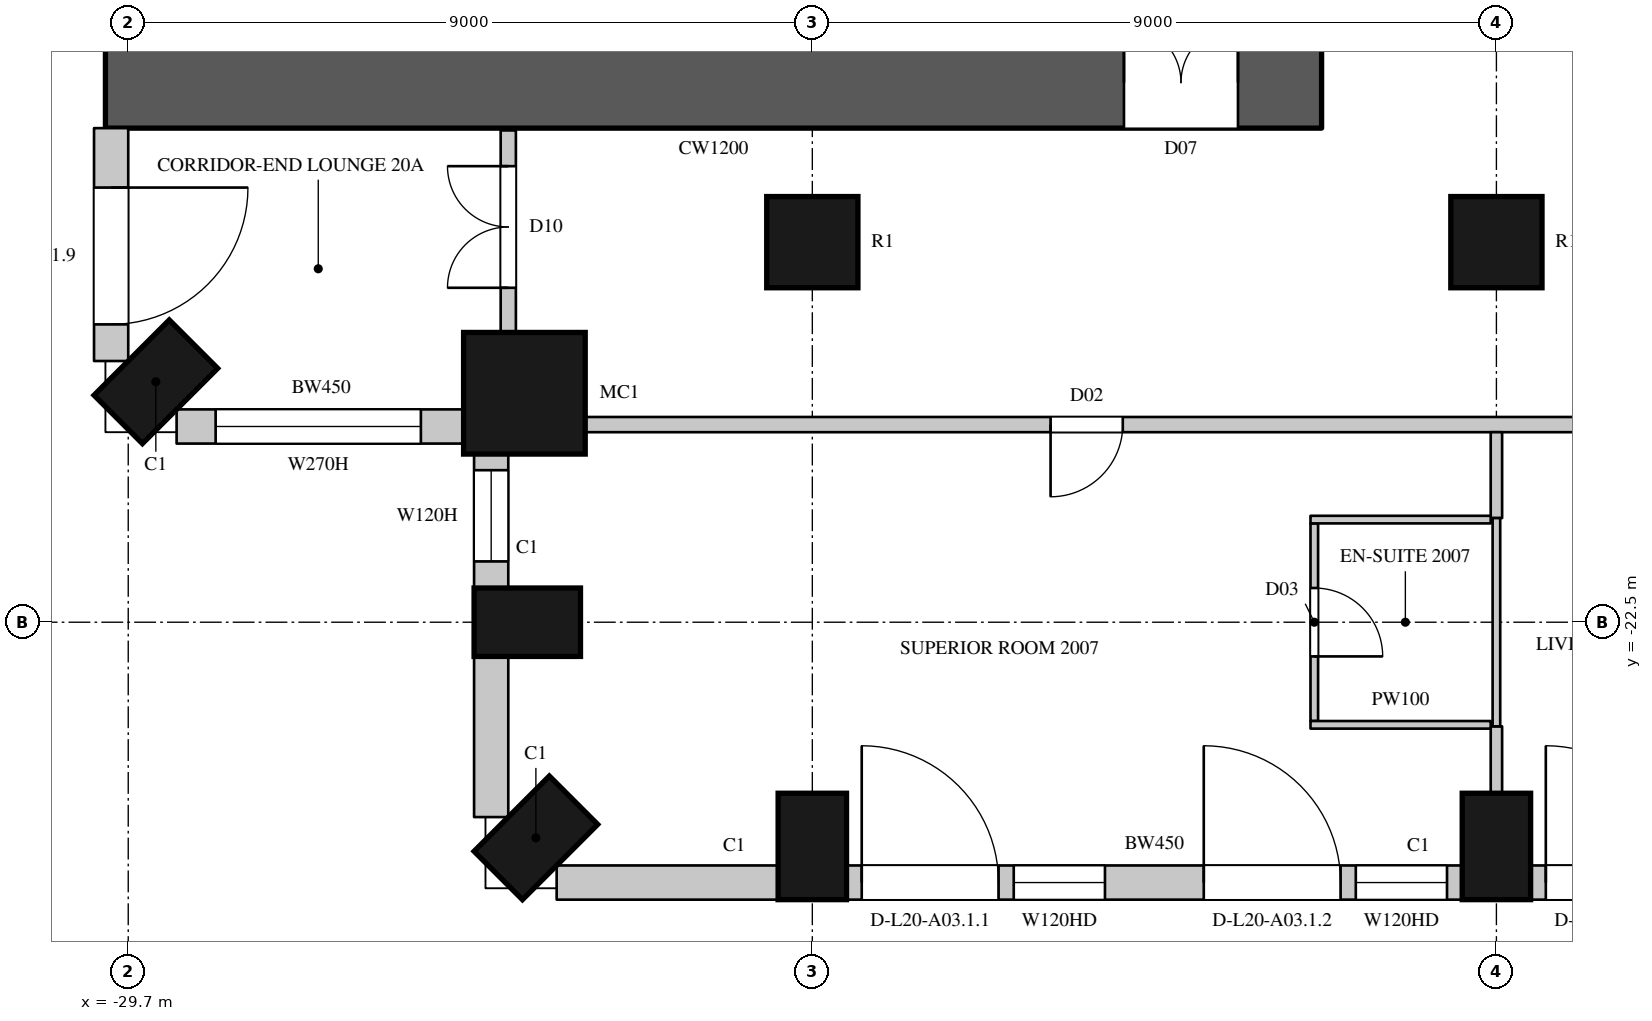
"""IFC4 building model, lengths in metres.
Left out: names, types, materials, properties, quantities, classifications, styles, units other than length and angle.
Written with IfcOpenShell. Run it as: python <this file> out.ifc"""

import sys

from ifc_helpers import new_model, si_unit, direction, frame, frame_2d, origin, origin_2d, place, context, subcontext, project, spatial, rectangle, circle, extrude, element, fill, save


model = new_model("IFC4")
c1 = context("Model", 3, precision=1e-05, world=origin(), true_north=direction((0.0, 1.0)))
c2 = subcontext(c1, "Body", "Model", "MODEL_VIEW")
j1 = project(units=[si_unit("LENGTHUNIT", "METRE"), si_unit("PLANEANGLEUNIT", "RADIAN")], contexts=[c1])
p1 = place(None, origin())
s1 = spatial("IfcSite", under=j1, at=p1, CompositionType="ELEMENT")
p2 = place(p1, origin())
s2 = spatial("IfcBuilding", under=s1, at=p2, CompositionType="ELEMENT")
p3 = place(p2, frame((0.0, 0.0, 102.3)))
s3 = spatial("IfcBuildingStorey", under=s2, at=p3, CompositionType="ELEMENT", Elevation=102.3)
p4 = place(p3, frame((-29.337, -19.337, 0.0), z_axis=(0.0, 0.0, 1.0), x_axis=(0.707106781187, -0.707106781187, 0.0)))
e1 = element("IfcColumn", 1, at=p4, inside=s3, PredefinedType="COLUMN", context=c2, shape_type="SweptSolid", body=[
    extrude(rectangle(XDim=0.9, YDim=1.4, at=origin_2d()), origin(), (0.0, 0.0, 1.0), 3.6),
])
p5 = place(p3, frame((-24.488, -19.488, 0.0), z_axis=(0.0, 0.0, 1.0), x_axis=(1.0, 0.0, 0.0)))
e2 = element("IfcColumn", 2, at=p5, inside=s3, PredefinedType="COLUMN", context=c2, shape_type="SweptSolid", body=[
    extrude(circle(Radius=0.8, at=origin_2d()), origin(), (0.0, 0.0, 1.0), 3.6),
])
for number, where, z_axis, x_axis in (
    (3, (-24.45, -22.5, 0.0), (0.0, 0.0, 1.0), (0.0, -1.0, 0.0)),
    (4, (-24.337, -25.337, 0.0), (0.0, 0.0, 1.0), (0.707, -0.707, 0.0)),
    (5, (-20.7, -25.45, 0.0), (0.0, 0.0, 1.0), (1.0, 0.0, 0.0)),
    (6, (-11.7, -25.45, 0.0), (0.0, 0.0, 1.0), (1.0, 0.0, 0.0)),
):
    element("IfcColumn", number, at=place(p3, frame(where, z_axis=z_axis, x_axis=x_axis)), inside=s3, PredefinedType="COLUMN", context=c2, shape_type="SweptSolid", body=[
        extrude(rectangle(XDim=0.9, YDim=1.4, at=origin_2d()), origin(), (0.0, 0.0, 1.0), 3.6),
    ])
for number, where, z_axis, x_axis in (
    (7, (-20.7, -17.5, 0.0), (0.0, 0.0, 1.0), (1.0, 0.0, 0.0)),
    (8, (-11.7, -17.5, 0.0), (0.0, 0.0, 1.0), (1.0, 0.0, 0.0)),
):
    element("IfcColumn", number, at=place(p3, frame(where, z_axis=z_axis, x_axis=x_axis)), inside=s3, PredefinedType="COLUMN", context=c2, shape_type="SweptSolid", body=[
        extrude(circle(Radius=0.6, at=origin_2d()), origin(), (0.0, 0.0, 1.0), 3.6),
    ])
p6 = place(p3, frame((-29.925, -16.0, 0.0), z_axis=(0.0, 0.0, 1.0), x_axis=(0.0, -1.0, 0.0)))
e9 = element("IfcWall", 9, at=p6, inside=s3, PredefinedType="SOLIDWALL", context=c2, shape_type="SweptSolid", body=[
    extrude(rectangle(XDim=3.064, YDim=0.45, at=frame_2d((1.532, 0.0))), origin(), (0.0, 0.0, 1.0), 3.3),
])
p7 = place(p6, frame((0.782, 0.0, 0.0)))
e10 = element("IfcOpeningElement", 10, at=p7, cuts=e9, PredefinedType="OPENING", context=c2, shape_type="SweptSolid", body=[
    extrude(rectangle(XDim=1.8, YDim=2.4, at=frame_2d((0.9, 1.2))), frame((0.0, 0.235, 0.0), z_axis=(0.0, -1.0, 0.0), x_axis=(1.0, 0.0, 0.0)), (0.0, 0.0, 1.0), 0.47),
])
p8 = place(p3, frame((-29.064, -19.925, 0.0), z_axis=(0.0, 0.0, 1.0), x_axis=(1.0, 0.0, 0.0)))
e11 = element("IfcWall", 11, at=p8, inside=s3, PredefinedType="SOLIDWALL", context=c2, shape_type="SweptSolid", body=[
    extrude(rectangle(XDim=3.805, YDim=0.45, at=frame_2d((1.903, 0.0))), origin(), (0.0, 0.0, 1.0), 3.3),
])
p9 = place(p8, frame((0.514, 0.0, 1.05)))
e12 = element("IfcOpeningElement", 12, at=p9, cuts=e11, PredefinedType="OPENING", context=c2, shape_type="SweptSolid", body=[
    extrude(rectangle(XDim=2.7, YDim=2.0, at=frame_2d((1.35, 1.0))), frame((0.0, 0.235, 0.0), z_axis=(0.0, -1.0, 0.0), x_axis=(1.0, 0.0, 0.0)), (0.0, 0.0, 1.0), 0.47),
])
p10 = place(p3, frame((-24.925, -20.259, 0.0), z_axis=(0.0, 0.0, 1.0), x_axis=(0.0, -1.0, 0.0)))
e13 = element("IfcWall", 13, at=p10, inside=s3, PredefinedType="SOLIDWALL", context=c2, shape_type="SweptSolid", body=[
    extrude(rectangle(XDim=1.792, YDim=0.45, at=frame_2d((0.896, 0.0))), origin(), (0.0, 0.0, 1.0), 3.3),
])
p11 = place(p10, frame((0.241, 0.0, 1.05)))
e14 = element("IfcOpeningElement", 14, at=p11, cuts=e13, PredefinedType="OPENING", context=c2, shape_type="SweptSolid", body=[
    extrude(rectangle(XDim=1.2, YDim=2.0, at=frame_2d((0.6, 1.0))), frame((0.0, 0.235, 0.0), z_axis=(0.0, -1.0, 0.0), x_axis=(1.0, 0.0, 0.0)), (0.0, 0.0, 1.0), 0.47),
])
p12 = place(p3, frame((-24.925, -22.95, 0.0), z_axis=(0.0, 0.0, 1.0), x_axis=(0.0, -1.0, 0.0)))
e15 = element("IfcWall", 15, at=p12, inside=s3, PredefinedType="SOLIDWALL", context=c2, shape_type="SweptSolid", body=[
    extrude(rectangle(XDim=2.114, YDim=0.45, at=frame_2d((1.057, 0.0))), origin(), (0.0, 0.0, 1.0), 3.3),
])
p13 = place(p3, frame((-24.064, -25.925, 0.0), z_axis=(0.0, 0.0, 1.0), x_axis=(1.0, 0.0, 0.0)))
e16 = element("IfcWall", 16, at=p13, inside=s3, PredefinedType="SOLIDWALL", context=c2, shape_type="SweptSolid", body=[
    extrude(rectangle(XDim=2.914, YDim=0.45, at=frame_2d((1.457, 0.0))), origin(), (0.0, 0.0, 1.0), 3.3),
])
p14 = place(p3, frame((-20.25, -25.925, 0.0), z_axis=(0.0, 0.0, 1.0), x_axis=(1.0, 0.0, 0.0)))
e17 = element("IfcWall", 17, at=p14, inside=s3, PredefinedType="SOLIDWALL", context=c2, shape_type="SweptSolid", body=[
    extrude(rectangle(XDim=8.1, YDim=0.45, at=frame_2d((4.05, 0.0))), origin(), (0.0, 0.0, 1.0), 3.3),
])
p15 = place(p14, frame((0.2, 0.0, 0.0)))
e18 = element("IfcOpeningElement", 18, at=p15, cuts=e17, PredefinedType="OPENING", context=c2, shape_type="SweptSolid", body=[
    extrude(rectangle(XDim=1.8, YDim=2.4, at=frame_2d((0.9, 1.2))), frame((0.0, 0.235, 0.0), z_axis=(0.0, -1.0, 0.0), x_axis=(1.0, 0.0, 0.0)), (0.0, 0.0, 1.0), 0.47),
])
p16 = place(p14, frame((2.2, 0.0, 1.05)))
e19 = element("IfcOpeningElement", 19, at=p16, cuts=e17, PredefinedType="OPENING", context=c2, shape_type="SweptSolid", body=[
    extrude(rectangle(XDim=1.2, YDim=2.0, at=frame_2d((0.6, 1.0))), frame((0.0, 0.235, 0.0), z_axis=(0.0, -1.0, 0.0), x_axis=(1.0, 0.0, 0.0)), (0.0, 0.0, 1.0), 0.47),
])
p17 = place(p14, frame((4.7, 0.0, 0.0)))
e20 = element("IfcOpeningElement", 20, at=p17, cuts=e17, PredefinedType="OPENING", context=c2, shape_type="SweptSolid", body=[
    extrude(rectangle(XDim=1.8, YDim=2.4, at=frame_2d((0.9, 1.2))), frame((0.0, 0.235, 0.0), z_axis=(0.0, -1.0, 0.0), x_axis=(1.0, 0.0, 0.0)), (0.0, 0.0, 1.0), 0.47),
])
p18 = place(p14, frame((6.7, 0.0, 1.05)))
e21 = element("IfcOpeningElement", 21, at=p18, cuts=e17, PredefinedType="OPENING", context=c2, shape_type="SweptSolid", body=[
    extrude(rectangle(XDim=1.2, YDim=2.0, at=frame_2d((0.6, 1.0))), frame((0.0, 0.235, 0.0), z_axis=(0.0, -1.0, 0.0), x_axis=(1.0, 0.0, 0.0)), (0.0, 0.0, 1.0), 0.47),
])
p19 = place(p3, frame((-11.25, -25.925, 0.0), z_axis=(0.0, 0.0, 1.0), x_axis=(1.0, 0.0, 0.0)))
e22 = element("IfcWall", 22, at=p19, inside=s3, PredefinedType="SOLIDWALL", context=c2, shape_type="SweptSolid", body=[
    extrude(rectangle(XDim=8.1, YDim=0.45, at=frame_2d((4.05, 0.0))), origin(), (0.0, 0.0, 1.0), 3.3),
])
p20 = place(p19, frame((0.2, 0.0, 0.0)))
e23 = element("IfcOpeningElement", 23, at=p20, cuts=e22, PredefinedType="OPENING", context=c2, shape_type="SweptSolid", body=[
    extrude(rectangle(XDim=1.8, YDim=2.4, at=frame_2d((0.9, 1.2))), frame((0.0, 0.235, 0.0), z_axis=(0.0, -1.0, 0.0), x_axis=(1.0, 0.0, 0.0)), (0.0, 0.0, 1.0), 0.47),
])
p21 = place(p19, frame((2.2, 0.0, 1.05)))
e24 = element("IfcOpeningElement", 24, at=p21, cuts=e22, PredefinedType="OPENING", context=c2, shape_type="SweptSolid", body=[
    extrude(rectangle(XDim=1.2, YDim=2.0, at=frame_2d((0.6, 1.0))), frame((0.0, 0.235, 0.0), z_axis=(0.0, -1.0, 0.0), x_axis=(1.0, 0.0, 0.0)), (0.0, 0.0, 1.0), 0.47),
])
p22 = place(p19, frame((4.7, 0.0, 0.0)))
e25 = element("IfcOpeningElement", 25, at=p22, cuts=e22, PredefinedType="OPENING", context=c2, shape_type="SweptSolid", body=[
    extrude(rectangle(XDim=1.8, YDim=2.4, at=frame_2d((0.9, 1.2))), frame((0.0, 0.235, 0.0), z_axis=(0.0, -1.0, 0.0), x_axis=(1.0, 0.0, 0.0)), (0.0, 0.0, 1.0), 0.47),
])
p23 = place(p19, frame((6.7, 0.0, 1.05)))
e26 = element("IfcOpeningElement", 26, at=p23, cuts=e22, PredefinedType="OPENING", context=c2, shape_type="SweptSolid", body=[
    extrude(rectangle(XDim=1.2, YDim=2.0, at=frame_2d((0.6, 1.0))), frame((0.0, 0.235, 0.0), z_axis=(0.0, -1.0, 0.0), x_axis=(1.0, 0.0, 0.0)), (0.0, 0.0, 1.0), 0.47),
])
p24 = place(p3, frame((-30.0, -15.4, 0.0), z_axis=(0.0, 0.0, 1.0), x_axis=(1.0, 0.0, 0.0)))
e27 = element("IfcWall", 27, at=p24, inside=s3, PredefinedType="SHEAR", context=c2, shape_type="SweptSolid", body=[
    extrude(rectangle(XDim=16.0, YDim=1.2, at=frame_2d((8.0, 0.0))), origin(), (0.0, 0.0, 1.0), 3.6),
])
p25 = place(p24, frame((13.4, 0.0, 0.0)))
e28 = element("IfcOpeningElement", 28, at=p25, cuts=e27, PredefinedType="OPENING", context=c2, shape_type="SweptSolid", body=[
    extrude(rectangle(XDim=1.5, YDim=2.4, at=frame_2d((0.75, 1.2))), frame((0.0, 0.61, 0.0), z_axis=(0.0, -1.0, 0.0), x_axis=(1.0, 0.0, 0.0)), (0.0, 0.0, 1.0), 1.22),
])
p26 = place(p3, frame((-24.7, -18.7, 0.0), z_axis=(0.0, 0.0, 1.0), x_axis=(0.0, 1.0, 0.0)))
e29 = element("IfcWall", 29, at=p26, inside=s3, PredefinedType="PARTITIONING", context=c2, shape_type="SweptSolid", body=[
    extrude(rectangle(XDim=2.67, YDim=0.2, at=frame_2d((1.335, 0.0))), origin(), (0.0, 0.0, 1.0), 3.3),
])
p27 = place(p26, frame((0.6, 0.0, 0.0)))
e30 = element("IfcOpeningElement", 30, at=p27, cuts=e29, PredefinedType="OPENING", context=c2, shape_type="SweptSolid", body=[
    extrude(rectangle(XDim=1.6, YDim=2.4, at=frame_2d((0.8, 1.2))), frame((0.0, 0.11, 0.0), z_axis=(0.0, -1.0, 0.0), x_axis=(1.0, 0.0, 0.0)), (0.0, 0.0, 1.0), 0.22),
])
p28 = place(p3, frame((-23.765, -19.9, 0.0), z_axis=(0.0, 0.0, 1.0), x_axis=(1.0, 0.0, 0.0)))
e31 = element("IfcWall", 31, at=p28, inside=s3, PredefinedType="PARTITIONING", context=c2, shape_type="SweptSolid", body=[
    extrude(rectangle(XDim=42.125, YDim=0.2, at=frame_2d((21.063, 0.0))), origin(), (0.0, 0.0, 1.0), 3.3),
])
p29 = place(p28, frame((6.2, 0.0, 0.0)))
e32 = element("IfcOpeningElement", 32, at=p29, cuts=e31, PredefinedType="OPENING", context=c2, shape_type="SweptSolid", body=[
    extrude(rectangle(XDim=0.95, YDim=2.2, at=frame_2d((0.475, 1.1))), frame((0.0, 0.11, 0.0), z_axis=(0.0, -1.0, 0.0), x_axis=(1.0, 0.0, 0.0)), (0.0, 0.0, 1.0), 0.22),
])
p30 = place(p28, frame((14.1, 0.0, 0.0)))
e33 = element("IfcOpeningElement", 33, at=p30, cuts=e31, PredefinedType="OPENING", context=c2, shape_type="SweptSolid", body=[
    extrude(rectangle(XDim=1.1, YDim=2.4, at=frame_2d((0.55, 1.2))), frame((0.0, 0.11, 0.0), z_axis=(0.0, -1.0, 0.0), x_axis=(1.0, 0.0, 0.0)), (0.0, 0.0, 1.0), 0.22),
])
p31 = place(p28, frame((24.2, 0.0, 0.0)))
e34 = element("IfcOpeningElement", 34, at=p31, cuts=e31, PredefinedType="OPENING", context=c2, shape_type="SweptSolid", body=[
    extrude(rectangle(XDim=0.95, YDim=2.2, at=frame_2d((0.475, 1.1))), frame((0.0, 0.11, 0.0), z_axis=(0.0, -1.0, 0.0), x_axis=(1.0, 0.0, 0.0)), (0.0, 0.0, 1.0), 0.22),
])
p32 = place(p28, frame((32.9, 0.0, 0.0)))
e35 = element("IfcOpeningElement", 35, at=p32, cuts=e31, PredefinedType="OPENING", context=c2, shape_type="SweptSolid", body=[
    extrude(rectangle(XDim=1.1, YDim=2.4, at=frame_2d((0.55, 1.2))), frame((0.0, 0.11, 0.0), z_axis=(0.0, -1.0, 0.0), x_axis=(1.0, 0.0, 0.0)), (0.0, 0.0, 1.0), 0.22),
])
p33 = place(p3, frame((-11.7, -24.75, 0.0), z_axis=(0.0, 0.0, 1.0), x_axis=(0.0, 1.0, 0.0)))
e36 = element("IfcWall", 36, at=p33, inside=s3, PredefinedType="PARTITIONING", context=c2, shape_type="SweptSolid", body=[
    extrude(rectangle(XDim=0.88, YDim=0.15, at=frame_2d((0.44, 0.0))), origin(), (0.0, 0.0, 1.0), 2.75),
])
p34 = place(p3, frame((-11.7, -21.13, 0.0), z_axis=(0.0, 0.0, 1.0), x_axis=(0.0, 1.0, 0.0)))
e37 = element("IfcWall", 37, at=p34, inside=s3, PredefinedType="PARTITIONING", context=c2, shape_type="SweptSolid", body=[
    extrude(rectangle(XDim=1.13, YDim=0.15, at=frame_2d((0.565, 0.0))), origin(), (0.0, 0.0, 1.0), 2.75),
])
p35 = place(p3, frame((-14.096, -23.8, 0.0), z_axis=(0.0, 0.0, 1.0), x_axis=(0.0, 1.0, 0.0)))
e38 = element("IfcWall", 38, at=p35, inside=s3, PredefinedType="PARTITIONING", context=c2, shape_type="SweptSolid", body=[
    extrude(rectangle(XDim=2.6, YDim=0.1, at=frame_2d((1.3, 0.0))), origin(), (0.0, 0.0, 1.0), 3.3),
])
p36 = place(p35, frame((0.85, 0.0, 0.0)))
e39 = element("IfcOpeningElement", 39, at=p36, cuts=e38, PredefinedType="OPENING", context=c2, shape_type="SweptSolid", body=[
    extrude(rectangle(XDim=0.9, YDim=2.2, at=frame_2d((0.45, 1.1))), frame((0.0, 0.06, 0.0), z_axis=(0.0, -1.0, 0.0), x_axis=(1.0, 0.0, 0.0)), (0.0, 0.0, 1.0), 0.12),
])
for number, where, z_axis, x_axis in (
    (40, (-14.146, -23.85, 0.0), (0.0, 0.0, 1.0), (1.0, 0.0, 0.0)),
    (41, (-14.146, -21.15, 0.0), (0.0, 0.0, 1.0), (1.0, 0.0, 0.0)),
):
    element("IfcWall", number, at=place(p3, frame(where, z_axis=z_axis, x_axis=x_axis)), inside=s3, PredefinedType="PARTITIONING", context=c2, shape_type="SweptSolid", body=[
        extrude(rectangle(XDim=2.371, YDim=0.1, at=frame_2d((1.186, 0.0))), origin(), (0.0, 0.0, 1.0), 3.3),
    ])
p37 = place(p3, frame((-11.7, -23.87, 0.0), z_axis=(0.0, 0.0, 1.0), x_axis=(0.0, 1.0, 0.0)))
e42 = element("IfcWall", 42, at=p37, inside=s3, PredefinedType="PARTITIONING", context=c2, shape_type="SweptSolid", body=[
    extrude(rectangle(XDim=2.74, YDim=0.1, at=frame_2d((1.37, 0.0))), origin(), (0.0, 0.0, 1.0), 2.75),
])
p38 = place(p7, origin())
e43 = element("IfcDoor", 43, at=p38, inside=s3, OperationType="SLIDING_TO_LEFT", PredefinedType="DOOR", context=c2, shape_type="SweptSolid", body=[
    extrude(rectangle(XDim=1.8, YDim=2.4, at=frame_2d((0.9, 1.2))), frame((0.0, 0.13, 0.0), z_axis=(0.0, -1.0, 0.0), x_axis=(1.0, 0.0, 0.0)), (0.0, 0.0, 1.0), 0.05),
])
fill(e10, e43)
p39 = place(p9, origin())
e44 = element("IfcWindow", 44, at=p39, inside=s3, PartitioningType="SINGLE_PANEL", PredefinedType="WINDOW", context=c2, shape_type="SweptSolid", body=[
    extrude(rectangle(XDim=2.7, YDim=2.0, at=frame_2d((1.35, 1.0))), frame((0.0, 0.135, 0.0), z_axis=(0.0, -1.0, 0.0), x_axis=(1.0, 0.0, 0.0)), (0.0, 0.0, 1.0), 0.06),
])
fill(e12, e44)
p40 = place(p11, origin())
e45 = element("IfcWindow", 45, at=p40, inside=s3, PartitioningType="SINGLE_PANEL", PredefinedType="WINDOW", context=c2, shape_type="SweptSolid", body=[
    extrude(rectangle(XDim=1.2, YDim=2.0, at=frame_2d((0.6, 1.0))), frame((0.0, 0.135, 0.0), z_axis=(0.0, -1.0, 0.0), x_axis=(1.0, 0.0, 0.0)), (0.0, 0.0, 1.0), 0.06),
])
fill(e14, e45)
p41 = place(p15, origin())
e46 = element("IfcDoor", 46, at=p41, inside=s3, OperationType="SLIDING_TO_LEFT", PredefinedType="DOOR", context=c2, shape_type="SweptSolid", body=[
    extrude(rectangle(XDim=1.8, YDim=2.4, at=frame_2d((0.9, 1.2))), frame((0.0, 0.13, 0.0), z_axis=(0.0, -1.0, 0.0), x_axis=(1.0, 0.0, 0.0)), (0.0, 0.0, 1.0), 0.05),
])
fill(e18, e46)
p42 = place(p16, origin())
e47 = element("IfcWindow", 47, at=p42, inside=s3, PartitioningType="SINGLE_PANEL", PredefinedType="WINDOW", context=c2, shape_type="SweptSolid", body=[
    extrude(rectangle(XDim=1.2, YDim=2.0, at=frame_2d((0.6, 1.0))), frame((0.0, 0.135, 0.0), z_axis=(0.0, -1.0, 0.0), x_axis=(1.0, 0.0, 0.0)), (0.0, 0.0, 1.0), 0.06),
])
fill(e19, e47)
p43 = place(p17, origin())
e48 = element("IfcDoor", 48, at=p43, inside=s3, OperationType="SLIDING_TO_LEFT", PredefinedType="DOOR", context=c2, shape_type="SweptSolid", body=[
    extrude(rectangle(XDim=1.8, YDim=2.4, at=frame_2d((0.9, 1.2))), frame((0.0, 0.13, 0.0), z_axis=(0.0, -1.0, 0.0), x_axis=(1.0, 0.0, 0.0)), (0.0, 0.0, 1.0), 0.05),
])
fill(e20, e48)
p44 = place(p18, origin())
e49 = element("IfcWindow", 49, at=p44, inside=s3, PartitioningType="SINGLE_PANEL", PredefinedType="WINDOW", context=c2, shape_type="SweptSolid", body=[
    extrude(rectangle(XDim=1.2, YDim=2.0, at=frame_2d((0.6, 1.0))), frame((0.0, 0.135, 0.0), z_axis=(0.0, -1.0, 0.0), x_axis=(1.0, 0.0, 0.0)), (0.0, 0.0, 1.0), 0.06),
])
fill(e21, e49)
p45 = place(p20, origin())
e50 = element("IfcDoor", 50, at=p45, inside=s3, OperationType="SLIDING_TO_LEFT", PredefinedType="DOOR", context=c2, shape_type="SweptSolid", body=[
    extrude(rectangle(XDim=1.8, YDim=2.4, at=frame_2d((0.9, 1.2))), frame((0.0, 0.13, 0.0), z_axis=(0.0, -1.0, 0.0), x_axis=(1.0, 0.0, 0.0)), (0.0, 0.0, 1.0), 0.05),
])
fill(e23, e50)
p46 = place(p27, origin())
e51 = element("IfcDoor", 51, at=p46, inside=s3, OperationType="DOUBLE_DOOR_SINGLE_SWING", PredefinedType="DOOR", context=c2, shape_type="SweptSolid", body=[
    extrude(rectangle(XDim=1.6, YDim=2.4, at=frame_2d((0.8, 1.2))), frame((0.0, 0.025, 0.0), z_axis=(0.0, -1.0, 0.0), x_axis=(1.0, 0.0, 0.0)), (0.0, 0.0, 1.0), 0.05),
])
fill(e30, e51)
p47 = place(p29, origin())
e52 = element("IfcDoor", 52, at=p47, inside=s3, OperationType="SINGLE_SWING_RIGHT", PredefinedType="DOOR", context=c2, shape_type="SweptSolid", body=[
    extrude(rectangle(XDim=0.95, YDim=2.2, at=frame_2d((0.475, 1.1))), frame((0.0, 0.025, 0.0), z_axis=(0.0, -1.0, 0.0), x_axis=(1.0, 0.0, 0.0)), (0.0, 0.0, 1.0), 0.05),
])
fill(e32, e52)
p48 = place(p36, origin())
e53 = element("IfcDoor", 53, at=p48, inside=s3, OperationType="SINGLE_SWING_RIGHT", PredefinedType="DOOR", context=c2, shape_type="SweptSolid", body=[
    extrude(rectangle(XDim=0.9, YDim=2.2, at=frame_2d((0.45, 1.1))), frame((0.0, 0.025, 0.0), z_axis=(0.0, -1.0, 0.0), x_axis=(1.0, 0.0, 0.0)), (0.0, 0.0, 1.0), 0.05),
])
fill(e39, e53)
p49 = place(p25, origin())
e54 = element("IfcDoor", 54, at=p49, inside=s3, OperationType="DOUBLE_DOOR_SINGLE_SWING", PredefinedType="DOOR", context=c2, shape_type="SweptSolid", body=[
    extrude(rectangle(XDim=1.5, YDim=2.4, at=frame_2d((0.75, 1.2))), frame((0.0, 0.025, 0.0), z_axis=(0.0, -1.0, 0.0), x_axis=(1.0, 0.0, 0.0)), (0.0, 0.0, 1.0), 0.05),
])
fill(e28, e54)
save(model, sys.argv[1])
